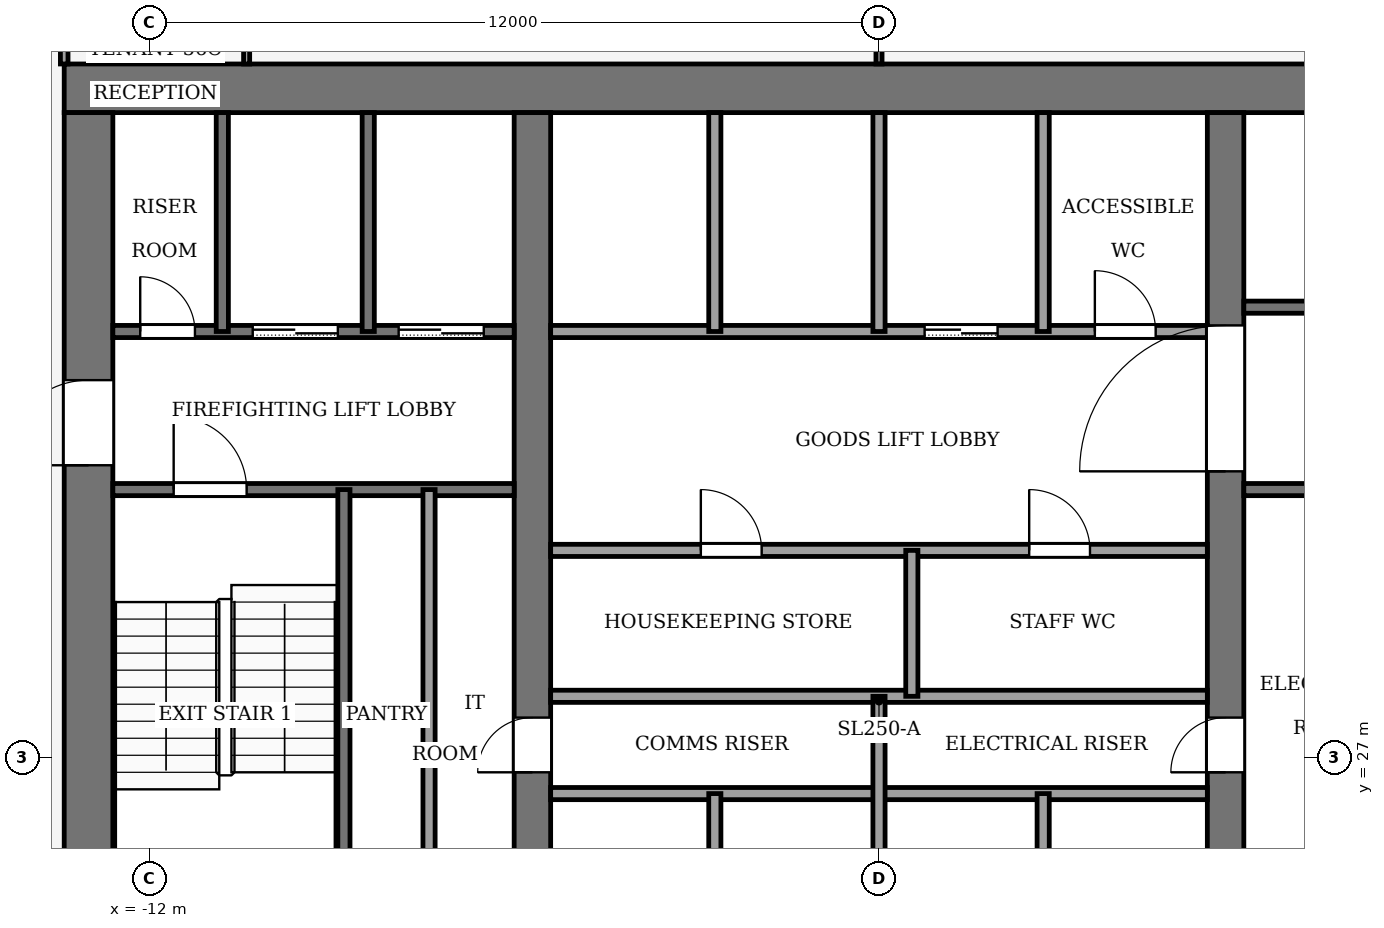
"""IFC4 building model, lengths in metres.
Left out: names, types, materials, properties, quantities, classifications, styles, units other than length and angle.
Written with IfcOpenShell. Run it as: python <this file> out.ifc"""

import sys

from ifc_helpers import new_model, si_unit, direction, frame, frame_2d, origin, place, context, subcontext, project, spatial, rectangle, extrude, element, fill, save


model = new_model("IFC4")
c1 = context("Model", 3, precision=1e-05, world=origin(), true_north=direction((0.0, 1.0)))
c2 = subcontext(c1, "Body", "Model", "MODEL_VIEW")
j1 = project(units=[si_unit("LENGTHUNIT", "METRE"), si_unit("PLANEANGLEUNIT", "RADIAN")], contexts=[c1])
p1 = place(None, origin())
s1 = spatial("IfcSite", under=j1, at=p1, CompositionType="ELEMENT")
p2 = place(p1, origin())
s2 = spatial("IfcBuilding", under=s1, at=p2, CompositionType="ELEMENT")
p3 = place(p2, frame((0.0, 0.0, 246.0)))
s3 = spatial("IfcBuildingStorey", under=s2, at=p3, CompositionType="ELEMENT", Elevation=246.0)
p4 = place(p3, frame((-13.4, 38.0, -0.13), z_axis=(0.0, 0.0, 1.0), x_axis=(1.0, 0.0, 0.0)))
e1 = element("IfcWall", 1, at=p4, inside=s3, PredefinedType="SHEAR", context=c2, shape_type="SweptSolid", body=[
    extrude(rectangle(XDim=26.8, YDim=0.8, at=frame_2d((13.4, 0.0))), origin(), (0.0, 0.0, 1.0), 4.0),
])
p5 = place(p3, frame((-13.0, 18.4, -0.13), z_axis=(0.0, 0.0, 1.0), x_axis=(0.0, 1.0, 0.0)))
e2 = element("IfcWall", 2, at=p5, inside=s3, PredefinedType="SHEAR", context=c2, shape_type="SweptSolid", body=[
    extrude(rectangle(XDim=19.2, YDim=0.8, at=frame_2d((9.6, 0.0))), origin(), (0.0, 0.0, 1.0), 4.0),
])
p6 = place(p5, frame((2.8, 0.0, 0.13)))
e3 = element("IfcOpeningElement", 3, at=p6, cuts=e2, PredefinedType="OPENING", context=c2, shape_type="SweptSolid", body=[
    extrude(rectangle(XDim=2.4, YDim=2.4, at=frame_2d((1.2, 1.2))), frame((0.0, 0.41, 0.0), z_axis=(0.0, -1.0, 0.0), x_axis=(1.0, 0.0, 0.0)), (0.0, 0.0, 1.0), 0.82),
])
p7 = place(p5, frame((13.4, 0.0, 0.13)))
e4 = element("IfcOpeningElement", 4, at=p7, cuts=e2, PredefinedType="OPENING", context=c2, shape_type="SweptSolid", body=[
    extrude(rectangle(XDim=1.4, YDim=2.2, at=frame_2d((0.7, 1.1))), frame((0.0, 0.41, 0.0), z_axis=(0.0, -1.0, 0.0), x_axis=(1.0, 0.0, 0.0)), (0.0, 0.0, 1.0), 0.82),
])
p8 = place(p3, frame((-5.7, 18.4, -0.13), z_axis=(0.0, 0.0, 1.0), x_axis=(0.0, 1.0, 0.0)))
e5 = element("IfcWall", 5, at=p8, inside=s3, PredefinedType="SHEAR", context=c2, shape_type="SweptSolid", body=[
    extrude(rectangle(XDim=19.2, YDim=0.6, at=frame_2d((9.6, 0.0))), origin(), (0.0, 0.0, 1.0), 4.0),
])
p9 = place(p8, frame((8.35, 0.0, 0.13)))
e6 = element("IfcOpeningElement", 6, at=p9, cuts=e5, PredefinedType="OPENING", context=c2, shape_type="SweptSolid", body=[
    extrude(rectangle(XDim=0.9, YDim=2.1, at=frame_2d((0.45, 1.05))), frame((0.0, 0.31, 0.0), z_axis=(0.0, -1.0, 0.0), x_axis=(1.0, 0.0, 0.0)), (0.0, 0.0, 1.0), 0.62),
])
p10 = place(p3, frame((5.7, 18.4, -0.13), z_axis=(0.0, 0.0, 1.0), x_axis=(0.0, 1.0, 0.0)))
e7 = element("IfcWall", 7, at=p10, inside=s3, PredefinedType="SHEAR", context=c2, shape_type="SweptSolid", body=[
    extrude(rectangle(XDim=19.2, YDim=0.6, at=frame_2d((9.6, 0.0))), origin(), (0.0, 0.0, 1.0), 4.0),
])
p11 = place(p10, frame((8.35, 0.0, 0.13)))
e8 = element("IfcOpeningElement", 8, at=p11, cuts=e7, PredefinedType="OPENING", context=c2, shape_type="SweptSolid", body=[
    extrude(rectangle(XDim=0.9, YDim=2.1, at=frame_2d((0.45, 1.05))), frame((0.0, 0.31, 0.0), z_axis=(0.0, -1.0, 0.0), x_axis=(1.0, 0.0, 0.0)), (0.0, 0.0, 1.0), 0.62),
])
p12 = place(p10, frame((13.3, 0.0, 0.13)))
e9 = element("IfcOpeningElement", 9, at=p12, cuts=e7, PredefinedType="OPENING", context=c2, shape_type="SweptSolid", body=[
    extrude(rectangle(XDim=2.4, YDim=2.4, at=frame_2d((1.2, 1.2))), frame((0.0, 0.31, 0.0), z_axis=(0.0, -1.0, 0.0), x_axis=(1.0, 0.0, 0.0)), (0.0, 0.0, 1.0), 0.62),
])
for number, where, z_axis, x_axis in (
    (10, (-5.4, 26.4, 0.0), (0.0, 0.0, 1.0), (1.0, 0.0, 0.0)),
    (11, (-5.4, 28.0, 0.0), (0.0, 0.0, 1.0), (1.0, 0.0, 0.0)),
):
    element("IfcWall", number, at=place(p3, frame(where, z_axis=z_axis, x_axis=x_axis)), inside=s3, PredefinedType="PARTITIONING", context=c2, shape_type="SweptSolid", body=[
        extrude(rectangle(XDim=10.8, YDim=0.2, at=frame_2d((5.4, 0.0))), origin(), (0.0, 0.0, 1.0), 3.87),
    ])
p13 = place(p3, frame((-5.4, 30.4, 0.0), z_axis=(0.0, 0.0, 1.0), x_axis=(1.0, 0.0, 0.0)))
e12 = element("IfcWall", 12, at=p13, inside=s3, PredefinedType="PARTITIONING", context=c2, shape_type="SweptSolid", body=[
    extrude(rectangle(XDim=10.8, YDim=0.2, at=frame_2d((5.4, 0.0))), origin(), (0.0, 0.0, 1.0), 3.87),
])
p14 = place(p13, frame((2.47, 0.0, 0.0)))
e13 = element("IfcOpeningElement", 13, at=p14, cuts=e12, PredefinedType="OPENING", context=c2, shape_type="SweptSolid", body=[
    extrude(rectangle(XDim=1.0, YDim=2.1, at=frame_2d((0.5, 1.05))), frame((0.0, 0.11, 0.0), z_axis=(0.0, -1.0, 0.0), x_axis=(1.0, 0.0, 0.0)), (0.0, 0.0, 1.0), 0.22),
])
p15 = place(p13, frame((7.87, 0.0, 0.0)))
e14 = element("IfcOpeningElement", 14, at=p15, cuts=e12, PredefinedType="OPENING", context=c2, shape_type="SweptSolid", body=[
    extrude(rectangle(XDim=1.0, YDim=2.1, at=frame_2d((0.5, 1.05))), frame((0.0, 0.11, 0.0), z_axis=(0.0, -1.0, 0.0), x_axis=(1.0, 0.0, 0.0)), (0.0, 0.0, 1.0), 0.22),
])
p16 = place(p3, frame((-12.6, 31.4, 0.0), z_axis=(0.0, 0.0, 1.0), x_axis=(1.0, 0.0, 0.0)))
e15 = element("IfcWall", 15, at=p16, inside=s3, PredefinedType="PARTITIONING", context=c2, shape_type="SweptSolid", body=[
    extrude(rectangle(XDim=6.6, YDim=0.2, at=frame_2d((3.3, 0.0))), origin(), (0.0, 0.0, 1.0), 3.87),
])
p17 = place(p16, frame((1.0, 0.0, 0.0)))
e16 = element("IfcOpeningElement", 16, at=p17, cuts=e15, PredefinedType="OPENING", context=c2, shape_type="SweptSolid", body=[
    extrude(rectangle(XDim=1.2, YDim=2.2, at=frame_2d((0.6, 1.1))), frame((0.0, 0.11, 0.0), z_axis=(0.0, -1.0, 0.0), x_axis=(1.0, 0.0, 0.0)), (0.0, 0.0, 1.0), 0.22),
])
p18 = place(p3, frame((6.0, 31.4, 0.0), z_axis=(0.0, 0.0, 1.0), x_axis=(1.0, 0.0, 0.0)))
e17 = element("IfcWall", 17, at=p18, inside=s3, PredefinedType="PARTITIONING", context=c2, shape_type="SweptSolid", body=[
    extrude(rectangle(XDim=6.6, YDim=0.2, at=frame_2d((3.3, 0.0))), origin(), (0.0, 0.0, 1.0), 3.87),
])
p19 = place(p3, frame((-12.6, 34.0, 0.0), z_axis=(0.0, 0.0, 1.0), x_axis=(1.0, 0.0, 0.0)))
e18 = element("IfcWall", 18, at=p19, inside=s3, PredefinedType="PARTITIONING", context=c2, shape_type="SweptSolid", body=[
    extrude(rectangle(XDim=6.6, YDim=0.2, at=frame_2d((3.3, 0.0))), origin(), (0.0, 0.0, 1.0), 3.87),
])
p20 = place(p19, frame((4.7, 0.0, 0.0)))
e19 = element("IfcOpeningElement", 19, at=p20, cuts=e18, PredefinedType="OPENING", context=c2, shape_type="SweptSolid", body=[
    extrude(rectangle(XDim=1.4, YDim=2.2, at=frame_2d((0.7, 1.1))), frame((0.0, 0.11, 0.0), z_axis=(0.0, -1.0, 0.0), x_axis=(1.0, 0.0, 0.0)), (0.0, 0.0, 1.0), 0.22),
])
p21 = place(p19, frame((2.3, 0.0, 0.0)))
e20 = element("IfcOpeningElement", 20, at=p21, cuts=e18, PredefinedType="OPENING", context=c2, shape_type="SweptSolid", body=[
    extrude(rectangle(XDim=1.4, YDim=2.2, at=frame_2d((0.7, 1.1))), frame((0.0, 0.11, 0.0), z_axis=(0.0, -1.0, 0.0), x_axis=(1.0, 0.0, 0.0)), (0.0, 0.0, 1.0), 0.22),
])
p22 = place(p19, frame((0.45, 0.0, 0.0)))
e21 = element("IfcOpeningElement", 21, at=p22, cuts=e18, PredefinedType="OPENING", context=c2, shape_type="SweptSolid", body=[
    extrude(rectangle(XDim=0.9, YDim=2.1, at=frame_2d((0.45, 1.05))), frame((0.0, 0.11, 0.0), z_axis=(0.0, -1.0, 0.0), x_axis=(1.0, 0.0, 0.0)), (0.0, 0.0, 1.0), 0.22),
])
p23 = place(p3, frame((-5.4, 34.0, 0.0), z_axis=(0.0, 0.0, 1.0), x_axis=(1.0, 0.0, 0.0)))
e22 = element("IfcWall", 22, at=p23, inside=s3, PredefinedType="PARTITIONING", context=c2, shape_type="SweptSolid", body=[
    extrude(rectangle(XDim=10.8, YDim=0.2, at=frame_2d((5.4, 0.0))), origin(), (0.0, 0.0, 1.0), 3.87),
])
p24 = place(p23, frame((6.15, 0.0, 0.0)))
e23 = element("IfcOpeningElement", 23, at=p24, cuts=e22, PredefinedType="OPENING", context=c2, shape_type="SweptSolid", body=[
    extrude(rectangle(XDim=1.2, YDim=2.2, at=frame_2d((0.6, 1.1))), frame((0.0, 0.11, 0.0), z_axis=(0.0, -1.0, 0.0), x_axis=(1.0, 0.0, 0.0)), (0.0, 0.0, 1.0), 0.22),
])
p25 = place(p23, frame((8.95, 0.0, 0.0)))
e24 = element("IfcOpeningElement", 24, at=p25, cuts=e22, PredefinedType="OPENING", context=c2, shape_type="SweptSolid", body=[
    extrude(rectangle(XDim=1.0, YDim=2.1, at=frame_2d((0.5, 1.05))), frame((0.0, 0.11, 0.0), z_axis=(0.0, -1.0, 0.0), x_axis=(1.0, 0.0, 0.0)), (0.0, 0.0, 1.0), 0.22),
])
p26 = place(p3, frame((6.0, 34.4, 0.0), z_axis=(0.0, 0.0, 1.0), x_axis=(1.0, 0.0, 0.0)))
e25 = element("IfcWall", 25, at=p26, inside=s3, PredefinedType="PARTITIONING", context=c2, shape_type="SweptSolid", body=[
    extrude(rectangle(XDim=6.6, YDim=0.2, at=frame_2d((3.3, 0.0))), origin(), (0.0, 0.0, 1.0), 3.87),
])
p27 = place(p26, frame((4.8, 0.0, 0.0)))
e26 = element("IfcOpeningElement", 26, at=p27, cuts=e25, PredefinedType="OPENING", context=c2, shape_type="SweptSolid", body=[
    extrude(rectangle(XDim=1.2, YDim=2.2, at=frame_2d((0.6, 1.1))), frame((0.0, 0.11, 0.0), z_axis=(0.0, -1.0, 0.0), x_axis=(1.0, 0.0, 0.0)), (0.0, 0.0, 1.0), 0.22),
])
p28 = place(p3, frame((-10.8, 34.0, 0.0), z_axis=(0.0, 0.0, 1.0), x_axis=(0.0, 1.0, 0.0)))
e27 = element("IfcWall", 27, at=p28, inside=s3, PredefinedType="PARTITIONING", context=c2, shape_type="SweptSolid", body=[
    extrude(rectangle(XDim=3.6, YDim=0.2, at=frame_2d((1.8, 0.0))), origin(), (0.0, 0.0, 1.0), 3.87),
])
p29 = place(p3, frame((-8.8, 24.0, 0.0), z_axis=(0.0, 0.0, 1.0), x_axis=(0.0, 1.0, 0.0)))
e28 = element("IfcWall", 28, at=p29, inside=s3, PredefinedType="PARTITIONING", context=c2, shape_type="SweptSolid", body=[
    extrude(rectangle(XDim=7.4, YDim=0.2, at=frame_2d((3.7, 0.0))), origin(), (0.0, 0.0, 1.0), 3.87),
])
p30 = place(p3, frame((-8.4, 34.0, 0.0), z_axis=(0.0, 0.0, 1.0), x_axis=(0.0, 1.0, 0.0)))
e29 = element("IfcWall", 29, at=p30, inside=s3, PredefinedType="PARTITIONING", context=c2, shape_type="SweptSolid", body=[
    extrude(rectangle(XDim=3.6, YDim=0.2, at=frame_2d((1.8, 0.0))), origin(), (0.0, 0.0, 1.0), 3.87),
])
p31 = place(p3, frame((-7.4, 24.0, 0.0), z_axis=(0.0, 0.0, 1.0), x_axis=(0.0, 1.0, 0.0)))
e30 = element("IfcWall", 30, at=p31, inside=s3, PredefinedType="PARTITIONING", context=c2, shape_type="SweptSolid", body=[
    extrude(rectangle(XDim=7.4, YDim=0.2, at=frame_2d((3.7, 0.0))), origin(), (0.0, 0.0, 1.0), 3.87),
])
p32 = place(p3, frame((-2.7, 24.0, 0.0), z_axis=(0.0, 0.0, 1.0), x_axis=(0.0, 1.0, 0.0)))
e31 = element("IfcWall", 31, at=p32, inside=s3, PredefinedType="PARTITIONING", context=c2, shape_type="SweptSolid", body=[
    extrude(rectangle(XDim=2.4, YDim=0.2, at=frame_2d((1.2, 0.0))), origin(), (0.0, 0.0, 1.0), 3.87),
])
p33 = place(p3, frame((-2.7, 34.0, 0.0), z_axis=(0.0, 0.0, 1.0), x_axis=(0.0, 1.0, 0.0)))
e32 = element("IfcWall", 32, at=p33, inside=s3, PredefinedType="PARTITIONING", context=c2, shape_type="SweptSolid", body=[
    extrude(rectangle(XDim=3.6, YDim=0.2, at=frame_2d((1.8, 0.0))), origin(), (0.0, 0.0, 1.0), 3.87),
])
p34 = place(p3, frame((0.0, 24.0, 0.0), z_axis=(0.0, 0.0, 1.0), x_axis=(0.0, 1.0, 0.0)))
e33 = element("IfcWall", 33, at=p34, inside=s3, PredefinedType="PARTITIONING", context=c2, shape_type="SweptSolid", body=[
    extrude(rectangle(XDim=4.0, YDim=0.2, at=frame_2d((2.0, 0.0))), origin(), (0.0, 0.0, 1.0), 3.87),
])
p35 = place(p3, frame((0.0, 34.0, 0.0), z_axis=(0.0, 0.0, 1.0), x_axis=(0.0, 1.0, 0.0)))
e34 = element("IfcWall", 34, at=p35, inside=s3, PredefinedType="PARTITIONING", context=c2, shape_type="SweptSolid", body=[
    extrude(rectangle(XDim=3.6, YDim=0.2, at=frame_2d((1.8, 0.0))), origin(), (0.0, 0.0, 1.0), 3.87),
])
for number, where, z_axis, x_axis in (
    (35, (0.54, 28.0, 0.0), (0.0, 0.0, 1.0), (0.0, 1.0, 0.0)),
    (36, (2.7, 24.0, 0.0), (0.0, 0.0, 1.0), (0.0, 1.0, 0.0)),
):
    element("IfcWall", number, at=place(p3, frame(where, z_axis=z_axis, x_axis=x_axis)), inside=s3, PredefinedType="PARTITIONING", context=c2, shape_type="SweptSolid", body=[
        extrude(rectangle(XDim=2.4, YDim=0.2, at=frame_2d((1.2, 0.0))), origin(), (0.0, 0.0, 1.0), 3.87),
    ])
p36 = place(p3, frame((2.7, 34.0, 0.0), z_axis=(0.0, 0.0, 1.0), x_axis=(0.0, 1.0, 0.0)))
e37 = element("IfcWall", 37, at=p36, inside=s3, PredefinedType="PARTITIONING", context=c2, shape_type="SweptSolid", body=[
    extrude(rectangle(XDim=3.6, YDim=0.2, at=frame_2d((1.8, 0.0))), origin(), (0.0, 0.0, 1.0), 3.87),
])
p37 = place(p3, frame((-13.4, 40.5, 0.0), z_axis=(0.0, 0.0, 1.0), x_axis=(0.0, -1.0, 0.0)))
e38 = element("IfcWall", 38, at=p37, inside=s3, PredefinedType="PARTITIONING", context=c2, shape_type="SweptSolid", body=[
    extrude(rectangle(XDim=2.1, YDim=0.125, at=frame_2d((1.05, 0.0))), origin(), (0.0, 0.0, 1.0), 3.14),
])
p38 = place(p37, frame((0.55, 0.0, 0.0)))
e39 = element("IfcOpeningElement", 39, at=p38, cuts=e38, PredefinedType="OPENING", context=c2, shape_type="SweptSolid", body=[
    extrude(rectangle(XDim=1.0, YDim=2.1, at=frame_2d((0.5, 1.05))), frame((0.0, 0.073, 0.0), z_axis=(0.0, -1.0, 0.0), x_axis=(1.0, 0.0, 0.0)), (0.0, 0.0, 1.0), 0.145),
])
p39 = place(p3, frame((-10.4, 38.4, 0.0), z_axis=(0.0, 0.0, 1.0), x_axis=(0.0, 1.0, 0.0)))
e40 = element("IfcWall", 40, at=p39, inside=s3, PredefinedType="PARTITIONING", context=c2, shape_type="SweptSolid", body=[
    extrude(rectangle(XDim=2.1, YDim=0.1, at=frame_2d((1.05, 0.0))), origin(), (0.0, 0.0, 1.0), 3.87),
])
p40 = place(p3, frame((0.0, 38.4, 0.0), z_axis=(0.0, 0.0, 1.0), x_axis=(0.0, 1.0, 0.0)))
e41 = element("IfcWall", 41, at=p40, inside=s3, PredefinedType="PARTITIONING", context=c2, shape_type="SweptSolid", body=[
    extrude(rectangle(XDim=2.104, YDim=0.1, at=frame_2d((1.052, 0.0))), origin(), (0.0, 0.0, 1.0), 3.44),
])
p41 = place(p24, origin())
e42 = element("IfcDoor", 42, at=p41, inside=s3, OperationType="SLIDING_TO_LEFT", PredefinedType="DOOR", context=c2, shape_type="SweptSolid", body=[
    extrude(rectangle(XDim=1.2, YDim=2.2, at=frame_2d((0.6, 1.1))), frame((0.0, 0.025, 0.0), z_axis=(0.0, -1.0, 0.0), x_axis=(1.0, 0.0, 0.0)), (0.0, 0.0, 1.0), 0.05),
])
fill(e23, e42)
p42 = place(p20, origin())
e43 = element("IfcDoor", 43, at=p42, inside=s3, OperationType="SLIDING_TO_LEFT", PredefinedType="DOOR", context=c2, shape_type="SweptSolid", body=[
    extrude(rectangle(XDim=1.4, YDim=2.2, at=frame_2d((0.7, 1.1))), frame((0.0, 0.025, 0.0), z_axis=(0.0, -1.0, 0.0), x_axis=(1.0, 0.0, 0.0)), (0.0, 0.0, 1.0), 0.05),
])
fill(e19, e43)
p43 = place(p21, origin())
e44 = element("IfcDoor", 44, at=p43, inside=s3, OperationType="SLIDING_TO_LEFT", PredefinedType="DOOR", context=c2, shape_type="SweptSolid", body=[
    extrude(rectangle(XDim=1.4, YDim=2.2, at=frame_2d((0.7, 1.1))), frame((0.0, 0.025, 0.0), z_axis=(0.0, -1.0, 0.0), x_axis=(1.0, 0.0, 0.0)), (0.0, 0.0, 1.0), 0.05),
])
fill(e20, e44)
p44 = place(p22, origin())
e45 = element("IfcDoor", 45, at=p44, inside=s3, OperationType="SINGLE_SWING_RIGHT", PredefinedType="DOOR", context=c2, shape_type="SweptSolid", body=[
    extrude(rectangle(XDim=0.9, YDim=2.1, at=frame_2d((0.45, 1.05))), frame((0.0, 0.025, 0.0), z_axis=(0.0, -1.0, 0.0), x_axis=(1.0, 0.0, 0.0)), (0.0, 0.0, 1.0), 0.05),
])
fill(e21, e45)
p45 = place(p14, origin())
e46 = element("IfcDoor", 46, at=p45, inside=s3, OperationType="SINGLE_SWING_RIGHT", PredefinedType="DOOR", context=c2, shape_type="SweptSolid", body=[
    extrude(rectangle(XDim=1.0, YDim=2.1, at=frame_2d((0.5, 1.05))), frame((0.0, 0.025, 0.0), z_axis=(0.0, -1.0, 0.0), x_axis=(1.0, 0.0, 0.0)), (0.0, 0.0, 1.0), 0.05),
])
fill(e13, e46)
p46 = place(p15, origin())
e47 = element("IfcDoor", 47, at=p46, inside=s3, OperationType="SINGLE_SWING_LEFT", PredefinedType="DOOR", context=c2, shape_type="SweptSolid", body=[
    extrude(rectangle(XDim=1.0, YDim=2.1, at=frame_2d((0.5, 1.05))), frame((0.0, 0.025, 0.0), z_axis=(0.0, -1.0, 0.0), x_axis=(1.0, 0.0, 0.0)), (0.0, 0.0, 1.0), 0.05),
])
fill(e14, e47)
p47 = place(p25, origin())
e48 = element("IfcDoor", 48, at=p47, inside=s3, OperationType="SINGLE_SWING_LEFT", PredefinedType="DOOR", context=c2, shape_type="SweptSolid", body=[
    extrude(rectangle(XDim=1.0, YDim=2.1, at=frame_2d((0.5, 1.05))), frame((0.0, 0.025, 0.0), z_axis=(0.0, -1.0, 0.0), x_axis=(1.0, 0.0, 0.0)), (0.0, 0.0, 1.0), 0.05),
])
fill(e24, e48)
p48 = place(p9, origin())
e49 = element("IfcDoor", 49, at=p48, inside=s3, OperationType="SINGLE_SWING_LEFT", PredefinedType="DOOR", context=c2, shape_type="SweptSolid", body=[
    extrude(rectangle(XDim=0.9, YDim=2.1, at=frame_2d((0.45, 1.05))), frame((0.0, 0.025, 0.0), z_axis=(0.0, -1.0, 0.0), x_axis=(1.0, 0.0, 0.0)), (0.0, 0.0, 1.0), 0.05),
])
fill(e6, e49)
p49 = place(p11, origin())
e50 = element("IfcDoor", 50, at=p49, inside=s3, OperationType="SINGLE_SWING_RIGHT", PredefinedType="DOOR", context=c2, shape_type="SweptSolid", body=[
    extrude(rectangle(XDim=0.9, YDim=2.1, at=frame_2d((0.45, 1.05))), frame((0.0, 0.025, 0.0), z_axis=(0.0, -1.0, 0.0), x_axis=(1.0, 0.0, 0.0)), (0.0, 0.0, 1.0), 0.05),
])
fill(e8, e50)
p50 = place(p17, origin())
e51 = element("IfcDoor", 51, at=p50, inside=s3, OperationType="SINGLE_SWING_RIGHT", PredefinedType="DOOR", context=c2, shape_type="SweptSolid", body=[
    extrude(rectangle(XDim=1.2, YDim=2.2, at=frame_2d((0.6, 1.1))), frame((0.0, 0.025, 0.0), z_axis=(0.0, -1.0, 0.0), x_axis=(1.0, 0.0, 0.0)), (0.0, 0.0, 1.0), 0.05),
])
fill(e16, e51)
p51 = place(p12, origin())
e52 = element("IfcDoor", 52, at=p51, inside=s3, OperationType="DOUBLE_DOOR_SINGLE_SWING", PredefinedType="DOOR", context=c2, shape_type="SweptSolid", body=[
    extrude(rectangle(XDim=2.4, YDim=2.4, at=frame_2d((1.2, 1.2))), frame((0.0, 0.025, 0.0), z_axis=(0.0, -1.0, 0.0), x_axis=(1.0, 0.0, 0.0)), (0.0, 0.0, 1.0), 0.05),
])
fill(e9, e52)
p52 = place(p7, origin())
e53 = element("IfcDoor", 53, at=p52, inside=s3, OperationType="SINGLE_SWING_RIGHT", PredefinedType="DOOR", context=c2, shape_type="SweptSolid", body=[
    extrude(rectangle(XDim=1.4, YDim=2.2, at=frame_2d((0.7, 1.1))), frame((0.0, 0.025, 0.0), z_axis=(0.0, -1.0, 0.0), x_axis=(1.0, 0.0, 0.0)), (0.0, 0.0, 1.0), 0.05),
])
fill(e4, e53)
save(model, sys.argv[1])
